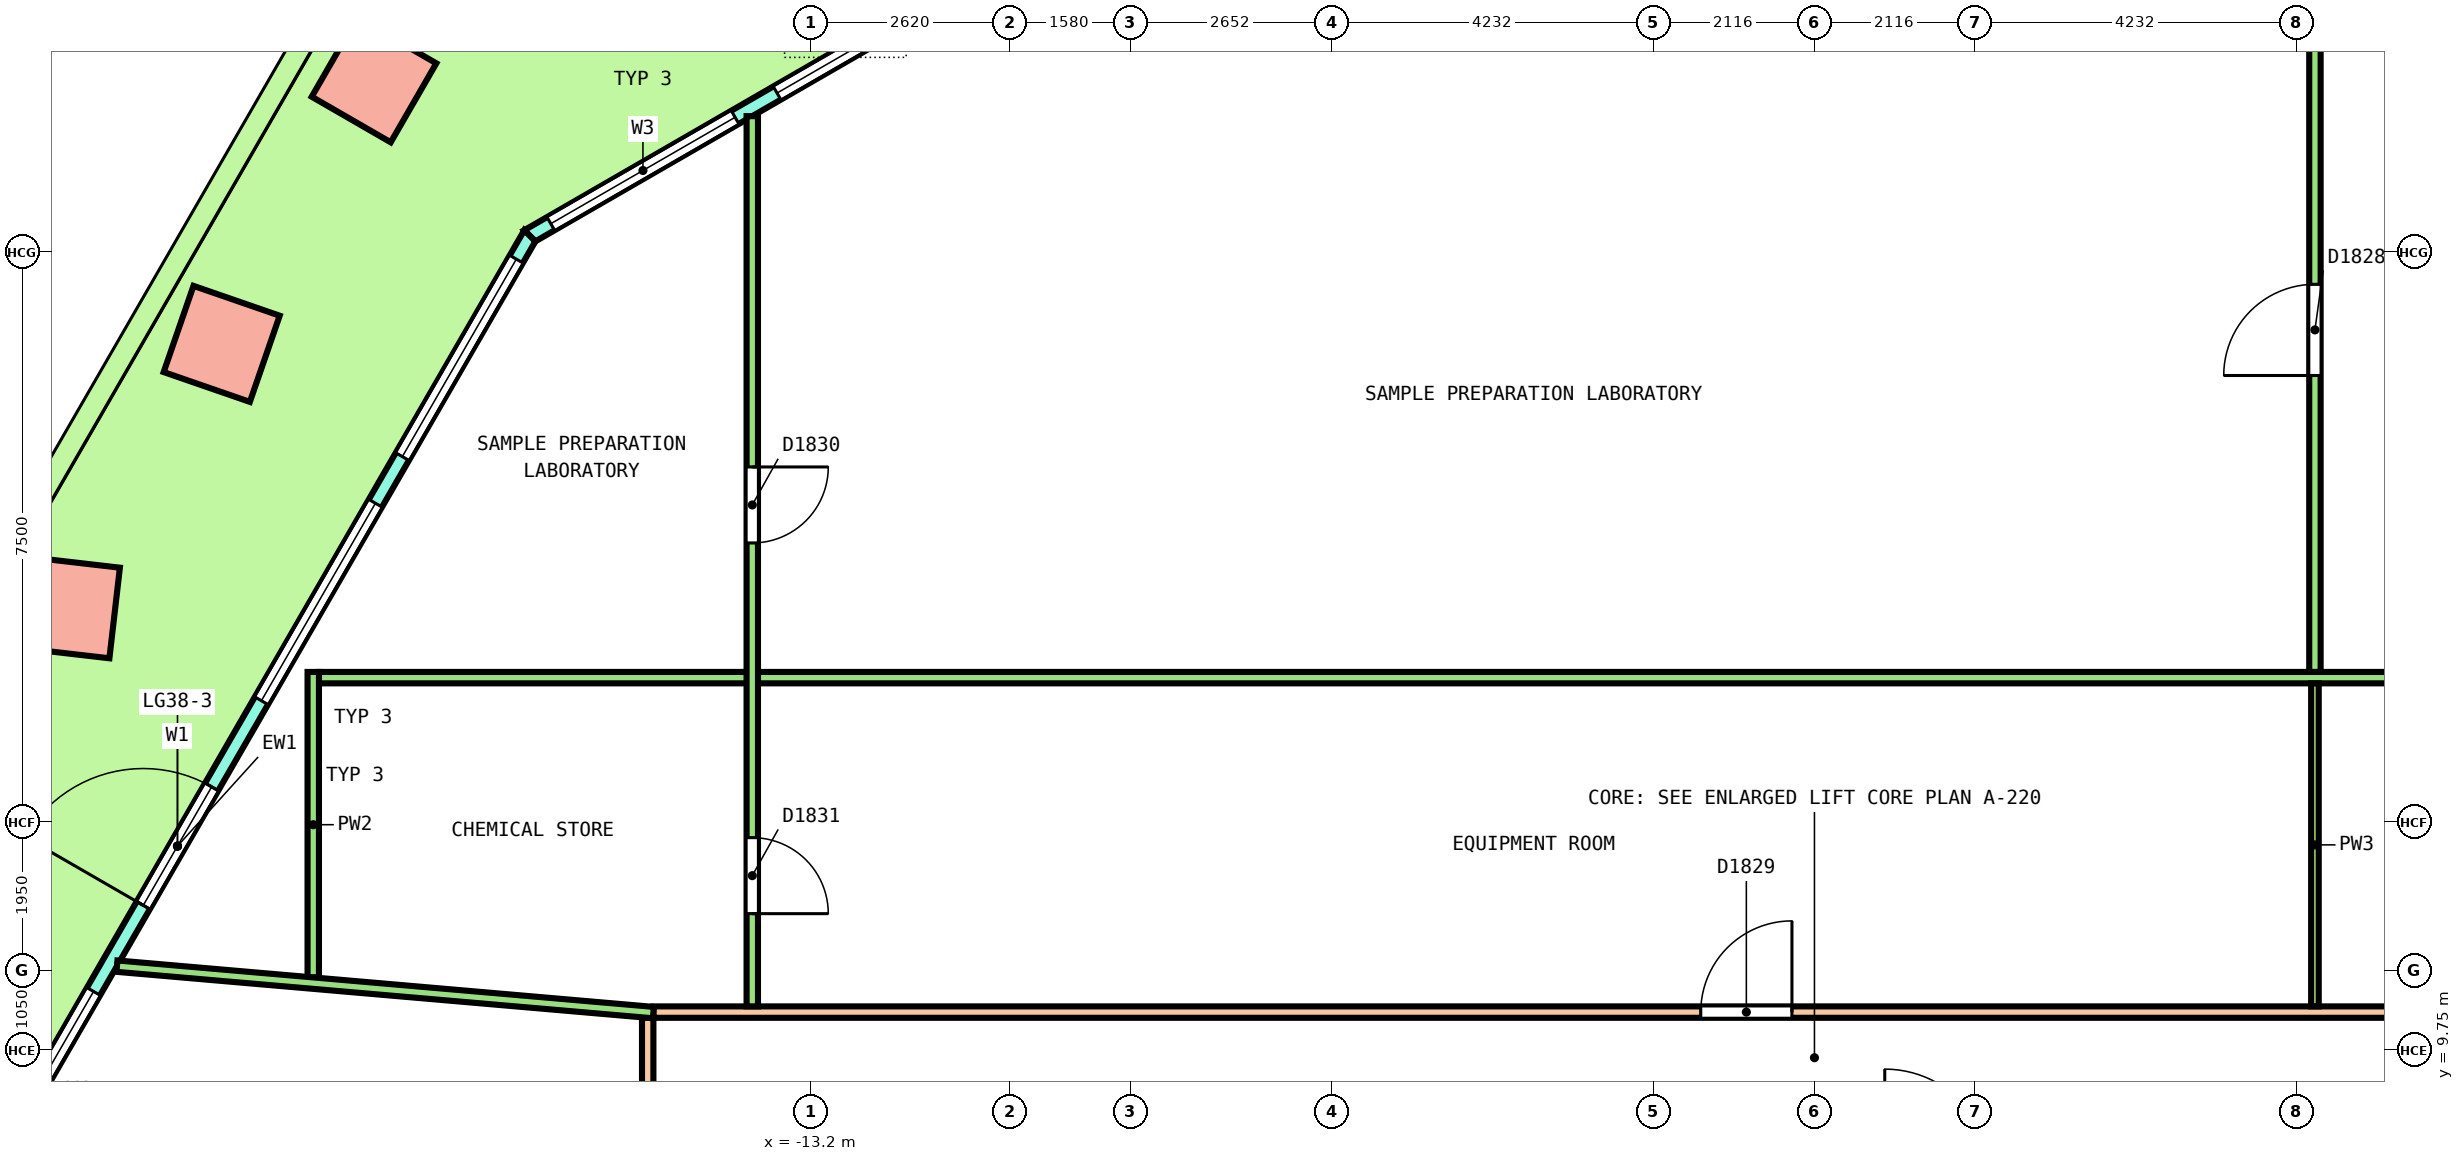
"""IFC4 building model, lengths in metres.
Left out: names, types, materials, properties, quantities, classifications, styles, units other than length and angle.
Written with IfcOpenShell. Run it as: python <this file> out.ifc"""

import sys

from ifc_helpers import new_model, si_unit, direction, frame, frame_2d, origin, origin_2d, place, context, subcontext, project, spatial, polyline, rectangle, outline, extrude, element, fill, save


model = new_model("IFC4")
c1 = context("Model", 3, precision=1e-05, world=origin(), true_north=direction((0.0, 1.0)))
c2 = subcontext(c1, "Body", "Model", "MODEL_VIEW")
j1 = project(units=[si_unit("LENGTHUNIT", "METRE"), si_unit("PLANEANGLEUNIT", "RADIAN")], contexts=[c1])
p1 = place(None, origin())
s1 = spatial("IfcSite", under=j1, at=p1, CompositionType="ELEMENT")
p2 = place(p1, origin())
s2 = spatial("IfcBuilding", under=s1, at=p2, CompositionType="ELEMENT")
p3 = place(p2, frame((0.0, 0.0, 176.0)))
s3 = spatial("IfcBuildingStorey", under=s2, at=p3, CompositionType="ELEMENT", Elevation=176.0)
p4 = place(p3, frame((-18.951, 22.512, 0.0), z_axis=(-0.036265236264, 0.0, 0.999342199969), x_axis=(-0.499424867419, -0.866167613071, -0.018123682572)))
e1 = element("IfcColumn", 1, at=p4, inside=s3, PredefinedType="COLUMN", context=c2, shape_type="SweptSolid", body=[
    extrude(rectangle(XDim=1.2, YDim=1.2, at=origin_2d()), origin(), (0.0, 0.0, 1.0), 4.053),
])
p5 = place(p3, frame((-20.955, 19.041, 0.0), z_axis=(-0.032654187208, 0.006265748099, 0.999447069363), x_axis=(-0.498938011444, -0.86656951925, -0.010868718561)))
e2 = element("IfcColumn", 2, at=p5, inside=s3, PredefinedType="COLUMN", context=c2, shape_type="SweptSolid", body=[
    extrude(rectangle(XDim=1.2, YDim=1.2, at=origin_2d()), origin(), (0.0, 0.0, 1.0), 4.052),
])
p6 = place(p3, frame((-22.959, 15.57, 0.0), z_axis=(-0.029040838643, 0.012592396839, 0.999498905068), x_axis=(-0.500555205851, -0.86569697754, -0.003637165647)))
e3 = element("IfcColumn", 3, at=p6, inside=s3, PredefinedType="COLUMN", context=c2, shape_type="SweptSolid", body=[
    extrude(rectangle(XDim=1.2, YDim=1.2, at=origin_2d()), origin(), (0.0, 0.0, 1.0), 4.052),
])
p7 = place(p3, frame((-10.947, 23.9, 0.0), z_axis=(0.0, 0.0, 1.0), x_axis=(-0.866029458321, -0.49999297727, 0.0)))
e4 = element("IfcWall", 4, at=p7, inside=s3, PredefinedType="SOLIDWALL", context=c2, shape_type="SweptSolid", body=[
    extrude(outline(polyline([(-0.027, -0.1), (1.128, -0.1), (2.282, -0.1), (3.437, -0.1), (4.592, -0.1), (5.747, -0.1), (6.901, -0.1), (6.848, 0.1), (5.711, 0.1), (4.574, 0.1), (3.437, 0.1), (2.301, 0.1), (1.164, 0.1), (0.027, 0.1), (-0.027, -0.1)])), origin(), (0.0, 0.0, 1.0), 4.1),
])
p8 = place(p7, frame((0.319, 0.0, 0.1)))
e5 = element("IfcOpeningElement", 5, at=p8, cuts=e4, PredefinedType="OPENING", context=c2, shape_type="SweptSolid", body=[
    extrude(rectangle(XDim=2.8, YDim=2.9, at=frame_2d((1.4, 1.45))), frame((0.0, 0.11, 0.0), z_axis=(0.0, -1.0, 0.0), x_axis=(1.0, 0.0, 0.0)), (0.0, 0.0, 1.0), 0.22),
])
p9 = place(p7, frame((3.756, 0.0, 0.1)))
e6 = element("IfcOpeningElement", 6, at=p9, cuts=e4, PredefinedType="OPENING", context=c2, shape_type="SweptSolid", body=[
    extrude(rectangle(XDim=2.8, YDim=2.9, at=frame_2d((1.4, 1.45))), frame((0.0, 0.11, 0.0), z_axis=(0.0, -1.0, 0.0), x_axis=(1.0, 0.0, 0.0)), (0.0, 0.0, 1.0), 0.22),
])
p10 = place(p3, frame((-16.901, 20.463, 0.0), z_axis=(0.0, 0.0, 1.0), x_axis=(-0.500000942564, -0.866024859594, 0.0)))
e7 = element("IfcWall", 7, at=p10, inside=s3, PredefinedType="SOLIDWALL", context=c2, shape_type="SweptSolid", body=[
    extrude(outline(polyline([(-0.027, -0.1), (1.006, -0.1), (2.039, -0.1), (3.072, -0.1), (4.105, -0.1), (5.138, -0.1), (6.172, -0.1), (7.205, -0.1), (8.238, -0.1), (9.271, -0.1), (10.304, -0.1), (11.337, -0.1), (12.37, -0.1), (13.403, -0.1), (14.436, -0.1), (15.469, -0.1), (16.502, -0.1), (17.535, -0.1), (18.568, -0.1), (18.515, 0.1), (17.488, 0.1), (16.46, 0.1), (15.433, 0.1), (14.406, 0.1), (13.379, 0.1), (12.352, 0.1), (11.325, 0.1), (10.298, 0.1), (9.271, 0.1), (8.244, 0.1), (7.217, 0.1), (6.189, 0.1), (5.162, 0.1), (4.135, 0.1), (3.108, 0.1), (2.081, 0.1), (1.054, 0.1), (0.027, 0.1), (-0.027, -0.1)])), origin(), (0.0, 0.0, 1.0), 4.1),
])
p11 = place(p10, frame((0.354, 0.0, 0.1)))
e8 = element("IfcOpeningElement", 8, at=p11, cuts=e7, PredefinedType="OPENING", context=c2, shape_type="SweptSolid", body=[
    extrude(rectangle(XDim=3.0, YDim=2.9, at=frame_2d((1.5, 1.45))), frame((0.0, 0.11, 0.0), z_axis=(0.0, -1.0, 0.0), x_axis=(1.0, 0.0, 0.0)), (0.0, 0.0, 1.0), 0.22),
])
p12 = place(p10, frame((4.062, 0.0, 0.1)))
e9 = element("IfcOpeningElement", 9, at=p12, cuts=e7, PredefinedType="OPENING", context=c2, shape_type="SweptSolid", body=[
    extrude(rectangle(XDim=3.0, YDim=2.9, at=frame_2d((1.5, 1.45))), frame((0.0, 0.11, 0.0), z_axis=(0.0, -1.0, 0.0), x_axis=(1.0, 0.0, 0.0)), (0.0, 0.0, 1.0), 0.22),
])
p13 = place(p10, frame((8.371, 0.0, 0.0)))
e10 = element("IfcOpeningElement", 10, at=p13, cuts=e7, PredefinedType="OPENING", context=c2, shape_type="SweptSolid", body=[
    extrude(rectangle(XDim=1.8, YDim=2.4, at=frame_2d((0.9, 1.2))), frame((0.0, 0.11, 0.0), z_axis=(0.0, -1.0, 0.0), x_axis=(1.0, 0.0, 0.0)), (0.0, 0.0, 1.0), 0.22),
])
p14 = place(p10, frame((8.371, 0.0, 2.55)))
e11 = element("IfcOpeningElement", 11, at=p14, cuts=e7, PredefinedType="OPENING", context=c2, shape_type="SweptSolid", body=[
    extrude(rectangle(XDim=1.8, YDim=0.45, at=frame_2d((0.9, 0.225))), frame((0.0, 0.11, 0.0), z_axis=(0.0, -1.0, 0.0), x_axis=(1.0, 0.0, 0.0)), (0.0, 0.0, 1.0), 0.22),
])
p15 = place(p10, frame((11.479, 0.0, 0.1)))
e12 = element("IfcOpeningElement", 12, at=p15, cuts=e7, PredefinedType="OPENING", context=c2, shape_type="SweptSolid", body=[
    extrude(rectangle(XDim=3.0, YDim=2.9, at=frame_2d((1.5, 1.45))), frame((0.0, 0.11, 0.0), z_axis=(0.0, -1.0, 0.0), x_axis=(1.0, 0.0, 0.0)), (0.0, 0.0, 1.0), 0.22),
])
p16 = place(p10, frame((15.188, 0.0, 0.1)))
e13 = element("IfcOpeningElement", 13, at=p16, cuts=e7, PredefinedType="OPENING", context=c2, shape_type="SweptSolid", body=[
    extrude(rectangle(XDim=3.0, YDim=2.9, at=frame_2d((1.5, 1.45))), frame((0.0, 0.11, 0.0), z_axis=(0.0, -1.0, 0.0), x_axis=(1.0, 0.0, 0.0)), (0.0, 0.0, 1.0), 0.22),
])
p17 = place(p3, frame((-15.275, 10.25, 0.0), z_axis=(0.0, 0.0, 1.0), x_axis=(1.0, 0.0, 0.0)))
e14 = element("IfcWall", 14, at=p17, inside=s3, PredefinedType="PARTITIONING", context=c2, shape_type="SweptSolid", body=[
    extrude(rectangle(XDim=30.55, YDim=0.15, at=frame_2d((15.275, 0.0))), origin(), (0.0, 0.0, 1.0), 3.05),
])
p18 = place(p17, frame((26.672, 0.0, 0.0)))
e15 = element("IfcOpeningElement", 15, at=p18, cuts=e14, PredefinedType="OPENING", context=c2, shape_type="SweptSolid", body=[
    extrude(rectangle(XDim=1.2, YDim=2.1, at=frame_2d((0.6, 1.05))), frame((0.0, 0.085, 0.0), z_axis=(0.0, -1.0, 0.0), x_axis=(1.0, 0.0, 0.0)), (0.0, 0.0, 1.0), 0.17),
])
p19 = place(p17, frame((13.779, 0.0, 0.0)))
e16 = element("IfcOpeningElement", 16, at=p19, cuts=e14, PredefinedType="OPENING", context=c2, shape_type="SweptSolid", body=[
    extrude(rectangle(XDim=1.2, YDim=2.1, at=frame_2d((0.6, 1.05))), frame((0.0, 0.085, 0.0), z_axis=(0.0, -1.0, 0.0), x_axis=(1.0, 0.0, 0.0)), (0.0, 0.0, 1.0), 0.17),
])
p20 = place(p3, frame((-15.35, 0.261, 0.0), z_axis=(0.0, 0.0, 1.0), x_axis=(0.0, 1.0, 0.0)))
e17 = element("IfcWall", 17, at=p20, inside=s3, PredefinedType="PARTITIONING", context=c2, shape_type="SweptSolid", body=[
    extrude(rectangle(XDim=9.914, YDim=0.15, at=frame_2d((4.957, 0.0))), origin(), (0.0, 0.0, 1.0), 3.05),
])
p21 = place(p3, frame((-19.675, 14.65, 0.0), z_axis=(0.0, 0.0, 1.0), x_axis=(1.0, 0.0, 0.0)))
e18 = element("IfcWall", 18, at=p21, inside=s3, PredefinedType="PARTITIONING", context=c2, shape_type="SweptSolid", body=[
    extrude(rectangle(XDim=39.5, YDim=0.15, at=frame_2d((19.75, 0.0))), origin(), (0.0, 0.0, 1.0), 3.05),
])
p22 = place(p21, frame((30.39, 0.0, 0.0)))
e19 = element("IfcOpeningElement", 19, at=p22, cuts=e18, PredefinedType="OPENING", context=c2, shape_type="SweptSolid", body=[
    extrude(rectangle(XDim=1.2, YDim=2.1, at=frame_2d((0.6, 1.05))), frame((0.0, 0.085, 0.0), z_axis=(0.0, -1.0, 0.0), x_axis=(1.0, 0.0, 0.0)), (0.0, 0.0, 1.0), 0.17),
])
p23 = place(p3, frame((6.584, 14.725, 0.0), z_axis=(0.0, 0.0, 1.0), x_axis=(0.0, 1.0, 0.0)))
e20 = element("IfcWall", 20, at=p23, inside=s3, PredefinedType="PARTITIONING", context=c2, shape_type="SweptSolid", body=[
    extrude(rectangle(XDim=9.075, YDim=0.15, at=frame_2d((4.538, 0.0))), origin(), (0.0, 0.0, 1.0), 3.05),
])
p24 = place(p23, frame((3.9, 0.0, 0.0)))
e21 = element("IfcOpeningElement", 21, at=p24, cuts=e20, PredefinedType="OPENING", context=c2, shape_type="SweptSolid", body=[
    extrude(rectangle(XDim=1.2, YDim=2.1, at=frame_2d((0.6, 1.05))), frame((0.0, 0.085, 0.0), z_axis=(0.0, -1.0, 0.0), x_axis=(1.0, 0.0, 0.0)), (0.0, 0.0, 1.0), 0.17),
])
p25 = place(p3, frame((-13.974, 10.325, 0.0), z_axis=(0.0, 0.0, 1.0), x_axis=(0.0, 1.0, 0.0)))
e22 = element("IfcWall", 22, at=p25, inside=s3, PredefinedType="PARTITIONING", context=c2, shape_type="SweptSolid", body=[
    extrude(rectangle(XDim=11.712, YDim=0.15, at=frame_2d((5.856, 0.0))), origin(), (0.0, 0.0, 1.0), 3.05),
])
p26 = place(p25, frame((6.097, 0.0, 0.0)))
e23 = element("IfcOpeningElement", 23, at=p26, cuts=e22, PredefinedType="OPENING", context=c2, shape_type="SweptSolid", body=[
    extrude(rectangle(XDim=1.0, YDim=2.1, at=frame_2d((0.5, 1.05))), frame((0.0, 0.085, 0.0), z_axis=(0.0, -1.0, 0.0), x_axis=(1.0, 0.0, 0.0)), (0.0, 0.0, 1.0), 0.17),
])
p27 = place(p25, frame((1.22, 0.0, 0.0)))
e24 = element("IfcOpeningElement", 24, at=p27, cuts=e22, PredefinedType="OPENING", context=c2, shape_type="SweptSolid", body=[
    extrude(rectangle(XDim=1.0, YDim=2.1, at=frame_2d((0.5, 1.05))), frame((0.0, 0.085, 0.0), z_axis=(0.0, -1.0, 0.0), x_axis=(1.0, 0.0, 0.0)), (0.0, 0.0, 1.0), 0.17),
])
p28 = place(p3, frame((-19.75, 10.706, 0.0), z_axis=(0.0, 0.0, 1.0), x_axis=(0.0, 1.0, 0.0)))
e25 = element("IfcWall", 25, at=p28, inside=s3, PredefinedType="PARTITIONING", context=c2, shape_type="SweptSolid", body=[
    extrude(rectangle(XDim=4.019, YDim=0.15, at=frame_2d((2.01, 0.0))), origin(), (0.0, 0.0, 1.0), 3.05),
])
p29 = place(p3, frame((-22.333, 10.854, 0.0), z_axis=(0.0, 0.0, 1.0), x_axis=(0.996272205844, -0.086265241334, 0.0)))
e26 = element("IfcWall", 26, at=p29, inside=s3, PredefinedType="PARTITIONING", context=c2, shape_type="SweptSolid", body=[
    extrude(rectangle(XDim=7.084, YDim=0.15, at=frame_2d((3.542, 0.0))), origin(), (0.0, 0.0, 1.0), 3.05),
])
p30 = place(p3, frame((6.584, 10.325, 0.0), z_axis=(0.0, 0.0, 1.0), x_axis=(0.0, 1.0, 0.0)))
e27 = element("IfcWall", 27, at=p30, inside=s3, PredefinedType="PARTITIONING", context=c2, shape_type="SweptSolid", body=[
    extrude(rectangle(XDim=4.25, YDim=0.1, at=frame_2d((2.125, 0.0))), origin(), (0.0, 0.0, 1.0), 3.05),
])
p31 = place(p8, origin())
e28 = element("IfcWindow", 28, at=p31, inside=s3, PartitioningType="SINGLE_PANEL", PredefinedType="WINDOW", context=c2, shape_type="SweptSolid", body=[
    extrude(rectangle(XDim=2.8, YDim=2.9, at=frame_2d((1.4, 1.45))), frame((0.0, 0.03, 0.0), z_axis=(0.0, -1.0, 0.0), x_axis=(1.0, 0.0, 0.0)), (0.0, 0.0, 1.0), 0.06),
])
fill(e5, e28)
p32 = place(p9, origin())
e29 = element("IfcWindow", 29, at=p32, inside=s3, PartitioningType="SINGLE_PANEL", PredefinedType="WINDOW", context=c2, shape_type="SweptSolid", body=[
    extrude(rectangle(XDim=2.8, YDim=2.9, at=frame_2d((1.4, 1.45))), frame((0.0, 0.03, 0.0), z_axis=(0.0, -1.0, 0.0), x_axis=(1.0, 0.0, 0.0)), (0.0, 0.0, 1.0), 0.06),
])
fill(e6, e29)
p33 = place(p11, origin())
e30 = element("IfcWindow", 30, at=p33, inside=s3, PartitioningType="SINGLE_PANEL", PredefinedType="WINDOW", context=c2, shape_type="SweptSolid", body=[
    extrude(rectangle(XDim=3.0, YDim=2.9, at=frame_2d((1.5, 1.45))), frame((0.0, 0.03, 0.0), z_axis=(0.0, -1.0, 0.0), x_axis=(1.0, 0.0, 0.0)), (0.0, 0.0, 1.0), 0.06),
])
fill(e8, e30)
p34 = place(p12, origin())
e31 = element("IfcWindow", 31, at=p34, inside=s3, PartitioningType="SINGLE_PANEL", PredefinedType="WINDOW", context=c2, shape_type="SweptSolid", body=[
    extrude(rectangle(XDim=3.0, YDim=2.9, at=frame_2d((1.5, 1.45))), frame((0.0, 0.03, 0.0), z_axis=(0.0, -1.0, 0.0), x_axis=(1.0, 0.0, 0.0)), (0.0, 0.0, 1.0), 0.06),
])
fill(e9, e31)
p35 = place(p13, origin())
e32 = element("IfcDoor", 32, at=p35, inside=s3, OperationType="DOUBLE_DOOR_SINGLE_SWING", PredefinedType="DOOR", context=c2, shape_type="SweptSolid", body=[
    extrude(rectangle(XDim=1.8, YDim=2.4, at=frame_2d((0.9, 1.2))), frame((0.0, 0.025, 0.0), z_axis=(0.0, -1.0, 0.0), x_axis=(1.0, 0.0, 0.0)), (0.0, 0.0, 1.0), 0.05),
])
fill(e10, e32)
p36 = place(p14, origin())
e33 = element("IfcWindow", 33, at=p36, inside=s3, PartitioningType="SINGLE_PANEL", PredefinedType="WINDOW", context=c2, shape_type="SweptSolid", body=[
    extrude(rectangle(XDim=1.8, YDim=0.45, at=frame_2d((0.9, 0.225))), frame((0.0, 0.03, 0.0), z_axis=(0.0, -1.0, 0.0), x_axis=(1.0, 0.0, 0.0)), (0.0, 0.0, 1.0), 0.06),
])
fill(e11, e33)
p37 = place(p15, origin())
e34 = element("IfcWindow", 34, at=p37, inside=s3, PartitioningType="SINGLE_PANEL", PredefinedType="WINDOW", context=c2, shape_type="SweptSolid", body=[
    extrude(rectangle(XDim=3.0, YDim=2.9, at=frame_2d((1.5, 1.45))), frame((0.0, 0.03, 0.0), z_axis=(0.0, -1.0, 0.0), x_axis=(1.0, 0.0, 0.0)), (0.0, 0.0, 1.0), 0.06),
])
fill(e12, e34)
p38 = place(p24, origin())
e35 = element("IfcDoor", 35, at=p38, inside=s3, OperationType="DOUBLE_DOOR_SINGLE_SWING", PredefinedType="DOOR", context=c2, shape_type="SweptSolid", body=[
    extrude(rectangle(XDim=1.2, YDim=2.1, at=frame_2d((0.6, 1.05))), frame((0.0, 0.025, 0.0), z_axis=(0.0, -1.0, 0.0), x_axis=(1.0, 0.0, 0.0)), (0.0, 0.0, 1.0), 0.05),
])
fill(e21, e35)
p39 = place(p19, origin())
e36 = element("IfcDoor", 36, at=p39, inside=s3, OperationType="DOUBLE_DOOR_SINGLE_SWING", PredefinedType="DOOR", context=c2, shape_type="SweptSolid", body=[
    extrude(rectangle(XDim=1.2, YDim=2.1, at=frame_2d((0.6, 1.05))), frame((0.0, 0.025, 0.0), z_axis=(0.0, -1.0, 0.0), x_axis=(1.0, 0.0, 0.0)), (0.0, 0.0, 1.0), 0.05),
])
fill(e16, e36)
p40 = place(p26, origin())
e37 = element("IfcDoor", 37, at=p40, inside=s3, OperationType="SINGLE_SWING_RIGHT", PredefinedType="DOOR", context=c2, shape_type="SweptSolid", body=[
    extrude(rectangle(XDim=1.0, YDim=2.1, at=frame_2d((0.5, 1.05))), frame((0.0, 0.025, 0.0), z_axis=(0.0, -1.0, 0.0), x_axis=(1.0, 0.0, 0.0)), (0.0, 0.0, 1.0), 0.05),
])
fill(e23, e37)
p41 = place(p27, origin())
e38 = element("IfcDoor", 38, at=p41, inside=s3, OperationType="SINGLE_SWING_RIGHT", PredefinedType="DOOR", context=c2, shape_type="SweptSolid", body=[
    extrude(rectangle(XDim=1.0, YDim=2.1, at=frame_2d((0.5, 1.05))), frame((0.0, 0.025, 0.0), z_axis=(0.0, -1.0, 0.0), x_axis=(1.0, 0.0, 0.0)), (0.0, 0.0, 1.0), 0.05),
])
fill(e24, e38)
save(model, sys.argv[1])
